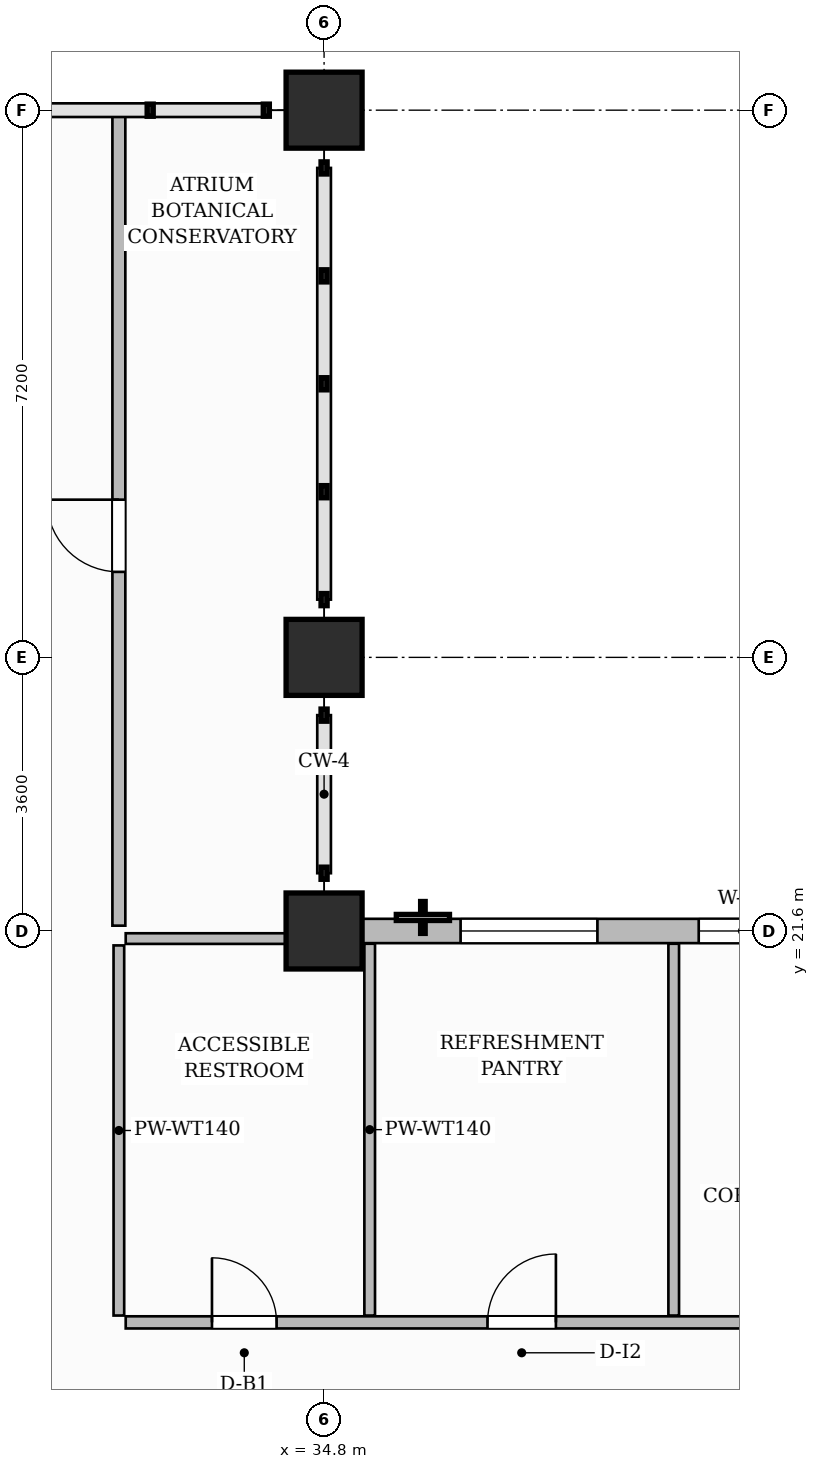
"""IFC4 building model, lengths in metres.
Left out: names, types, materials, properties, quantities, classifications, styles, units other than length and angle.
Written with IfcOpenShell. Run it as: python <this file> out.ifc"""

import sys

from ifc_helpers import new_model, si_unit, direction, frame, frame_2d, origin, origin_2d, place, context, subcontext, project, spatial, rectangle, extrude, source, transform, mapped, element, fill, save


model = new_model("IFC4")
c1 = context("Model", 3, precision=1e-05, world=origin(), true_north=direction((0.0, 1.0)))
c2 = subcontext(c1, "Body", "Model", "MODEL_VIEW")
j1 = project(units=[si_unit("LENGTHUNIT", "METRE"), si_unit("PLANEANGLEUNIT", "RADIAN")], contexts=[c1])
p1 = place(None, origin())
s1 = spatial("IfcSite", under=j1, at=p1, CompositionType="ELEMENT")
p2 = place(p1, origin())
s2 = spatial("IfcBuilding", under=s1, at=p2, CompositionType="ELEMENT")
p3 = place(p2, frame((0.0, 0.0, 145.1)))
s3 = spatial("IfcBuildingStorey", under=s2, at=p3, CompositionType="ELEMENT", Elevation=145.1)
m1 = source(origin(), c2, "Body", "SweptSolid", [
    extrude(rectangle(XDim=1.0, YDim=1.0, at=origin_2d()), origin(), (0.0, 0.0, 1.0), 5.2),
])
for number, where, z_axis, x_axis in (
    (1, (34.8, 21.6, 0.0), (0.0, 0.0, 1.0), (1.0, 0.0, 0.0)),
    (2, (34.8, 25.2, 0.0), (0.0, 0.0, 1.0), (1.0, 0.0, 0.0)),
    (3, (34.8, 32.4, 0.0), (0.0, 0.0, 1.0), (1.0, 0.0, 0.0)),
):
    element("IfcColumn", number, at=place(p3, frame(where, z_axis=z_axis, x_axis=x_axis)), inside=s3, PredefinedType="COLUMN", context=c2, shape_type="MappedRepresentation", body=[
        mapped(m1, transform((0.0, 0.0, 0.0), scale=1.0)),
    ])
p4 = place(p3, frame((32.19, 16.45, 0.0), z_axis=(0.0, 0.0, 1.0), x_axis=(1.0, 0.0, 0.0)))
e4 = element("IfcWall", 4, at=p4, inside=s3, PredefinedType="PARTITIONING", context=c2, shape_type="SweptSolid", body=[
    extrude(rectangle(XDim=17.47, YDim=0.16, at=frame_2d((8.735, 0.0))), origin(), (0.0, 0.0, 1.0), 4.95),
])
p5 = place(p4, frame((1.135, 0.0, 0.0)))
e5 = element("IfcOpeningElement", 5, at=p5, cuts=e4, PredefinedType="OPENING", context=c2, shape_type="SweptSolid", body=[
    extrude(rectangle(XDim=0.85, YDim=2.1, at=frame_2d((0.425, 1.05))), frame((0.0, 0.09, 0.0), z_axis=(0.0, -1.0, 0.0), x_axis=(1.0, 0.0, 0.0)), (0.0, 0.0, 1.0), 0.18),
])
p6 = place(p4, frame((4.76, 0.0, 0.0)))
e6 = element("IfcOpeningElement", 6, at=p6, cuts=e4, PredefinedType="OPENING", context=c2, shape_type="SweptSolid", body=[
    extrude(rectangle(XDim=0.9, YDim=2.15, at=frame_2d((0.45, 1.075))), frame((0.0, 0.09, 0.0), z_axis=(0.0, -1.0, 0.0), x_axis=(1.0, 0.0, 0.0)), (0.0, 0.0, 1.0), 0.18),
])
p7 = place(p4, frame((8.735, 0.0, 0.0)))
e7 = element("IfcOpeningElement", 7, at=p7, cuts=e4, PredefinedType="OPENING", context=c2, shape_type="SweptSolid", body=[
    extrude(rectangle(XDim=0.95, YDim=2.15, at=frame_2d((0.475, 1.075))), frame((0.0, 0.09, 0.0), z_axis=(0.0, -1.0, 0.0), x_axis=(1.0, 0.0, 0.0)), (0.0, 0.0, 1.0), 0.18),
])
p8 = place(p4, frame((14.335, 0.0, 0.0)))
e8 = element("IfcOpeningElement", 8, at=p8, cuts=e4, PredefinedType="OPENING", context=c2, shape_type="SweptSolid", body=[
    extrude(rectangle(XDim=0.95, YDim=2.15, at=frame_2d((0.475, 1.075))), frame((0.0, 0.09, 0.0), z_axis=(0.0, -1.0, 0.0), x_axis=(1.0, 0.0, 0.0)), (0.0, 0.0, 1.0), 0.18),
])
p9 = place(p3, frame((32.1, 16.54, 0.0), z_axis=(0.0, 0.0, 1.0), x_axis=(0.0, 1.0, 0.0)))
e9 = element("IfcWall", 9, at=p9, inside=s3, PredefinedType="PARTITIONING", context=c2, shape_type="SweptSolid", body=[
    extrude(rectangle(XDim=4.87, YDim=0.14, at=frame_2d((2.435, 0.0))), origin(), (0.0, 0.0, 1.0), 4.95),
])
for number, where, z_axis, x_axis in (
    (10, (35.4, 16.54, 0.0), (0.0, 0.0, 1.0), (0.0, 1.0, 0.0)),
    (11, (39.4, 16.54, 0.0), (0.0, 0.0, 1.0), (0.0, 1.0, 0.0)),
):
    element("IfcWall", number, at=place(p3, frame(where, z_axis=z_axis, x_axis=x_axis)), inside=s3, PredefinedType="PARTITIONING", context=c2, shape_type="SweptSolid", body=[
        extrude(rectangle(XDim=4.892, YDim=0.14, at=frame_2d((2.446, 0.0))), origin(), (0.0, 0.0, 1.0), 4.95),
    ])
p10 = place(p3, frame((32.19, 21.5, 0.0), z_axis=(0.0, 0.0, 1.0), x_axis=(1.0, 0.0, 0.0)))
e12 = element("IfcWall", 12, at=p10, inside=s3, PredefinedType="PARTITIONING", context=c2, shape_type="SweptSolid", body=[
    extrude(rectangle(XDim=2.42, YDim=0.14, at=frame_2d((1.21, 0.0))), origin(), (0.0, 0.0, 1.0), 4.335),
])
p11 = place(p3, frame((32.1, 21.67, 0.0), z_axis=(0.0, 0.0, 1.0), x_axis=(0.0, 1.0, 0.0)))
e13 = element("IfcWall", 13, at=p11, inside=s3, PredefinedType="PARTITIONING", context=c2, shape_type="SweptSolid", body=[
    extrude(rectangle(XDim=10.702, YDim=0.17, at=frame_2d((5.351, 0.0))), origin(), (0.0, 0.0, 1.0), 4.95),
])
p12 = place(p11, frame((4.655, 0.0, 0.0)))
e14 = element("IfcOpeningElement", 14, at=p12, cuts=e13, PredefinedType="OPENING", context=c2, shape_type="SweptSolid", body=[
    extrude(rectangle(XDim=0.95, YDim=2.15, at=frame_2d((0.475, 1.075))), frame((0.0, 0.095, 0.0), z_axis=(0.0, -1.0, 0.0), x_axis=(1.0, 0.0, 0.0)), (0.0, 0.0, 1.0), 0.19),
])
p13 = place(p3, frame((34.8, 21.6, 0.0), z_axis=(0.0, 0.0, 1.0), x_axis=(1.0, 0.0, 0.0)))
e15 = element("IfcWall", 15, at=p13, inside=s3, PredefinedType="SOLIDWALL", context=c2, shape_type="SweptSolid", body=[
    extrude(rectangle(XDim=15.0, YDim=0.32, at=frame_2d((7.5, 0.0))), origin(), (0.0, 0.0, 1.0), 4.335),
])
p14 = place(p13, frame((1.796, 0.0, 0.8)))
e16 = element("IfcOpeningElement", 16, at=p14, cuts=e15, PredefinedType="OPENING", context=c2, shape_type="SweptSolid", body=[
    extrude(rectangle(XDim=1.8, YDim=1.85, at=frame_2d((0.9, 0.925))), frame((0.0, 0.17, 0.0), z_axis=(0.0, -1.0, 0.0), x_axis=(1.0, 0.0, 0.0)), (0.0, 0.0, 1.0), 0.34),
])
p15 = place(p13, frame((4.929, 0.0, 0.8)))
e17 = element("IfcOpeningElement", 17, at=p15, cuts=e15, PredefinedType="OPENING", context=c2, shape_type="SweptSolid", body=[
    extrude(rectangle(XDim=1.15, YDim=1.8, at=frame_2d((0.575, 0.9))), frame((0.0, 0.17, 0.0), z_axis=(0.0, -1.0, 0.0), x_axis=(1.0, 0.0, 0.0)), (0.0, 0.0, 1.0), 0.34),
])
p16 = place(p13, frame((8.321, 0.0, 0.8)))
e18 = element("IfcOpeningElement", 18, at=p16, cuts=e15, PredefinedType="OPENING", context=c2, shape_type="SweptSolid", body=[
    extrude(rectangle(XDim=0.95, YDim=1.75, at=frame_2d((0.475, 0.875))), frame((0.0, 0.17, 0.0), z_axis=(0.0, -1.0, 0.0), x_axis=(1.0, 0.0, 0.0)), (0.0, 0.0, 1.0), 0.34),
])
p17 = place(p13, frame((11.004, 0.0, 0.8)))
e19 = element("IfcOpeningElement", 19, at=p17, cuts=e15, PredefinedType="OPENING", context=c2, shape_type="SweptSolid", body=[
    extrude(rectangle(XDim=1.8, YDim=1.85, at=frame_2d((0.9, 0.925))), frame((0.0, 0.17, 0.0), z_axis=(0.0, -1.0, 0.0), x_axis=(1.0, 0.0, 0.0)), (0.0, 0.0, 1.0), 0.34),
])
m2 = source(origin(), c2, "Body", "SweptSolid", [
    extrude(rectangle(XDim=0.85, YDim=2.1, at=frame_2d((0.425, 1.05))), frame((0.0, 0.025, 0.0), z_axis=(0.0, -1.0, 0.0), x_axis=(1.0, 0.0, 0.0)), (0.0, 0.0, 1.0), 0.05),
])
p18 = place(p5, origin())
e20 = element("IfcDoor", 20, at=p18, inside=s3, OperationType="SINGLE_SWING_LEFT", PredefinedType="DOOR", context=c2, shape_type="MappedRepresentation", body=[
    mapped(m2, transform((0.0, 0.0, 0.0), scale=1.0)),
])
fill(e5, e20)
m3 = source(origin(), c2, "Body", "SweptSolid", [
    extrude(rectangle(XDim=0.9, YDim=2.15, at=frame_2d((0.45, 1.075))), frame((0.0, 0.025, 0.0), z_axis=(0.0, -1.0, 0.0), x_axis=(1.0, 0.0, 0.0)), (0.0, 0.0, 1.0), 0.05),
])
p19 = place(p6, origin())
e21 = element("IfcDoor", 21, at=p19, inside=s3, OperationType="SINGLE_SWING_RIGHT", PredefinedType="DOOR", context=c2, shape_type="MappedRepresentation", body=[
    mapped(m3, transform((0.0, 0.0, 0.0), scale=1.0)),
])
fill(e6, e21)
m4 = source(origin(), c2, "Body", "SweptSolid", [
    extrude(rectangle(XDim=0.95, YDim=2.15, at=frame_2d((0.475, 1.075))), frame((0.0, 0.025, 0.0), z_axis=(0.0, -1.0, 0.0), x_axis=(1.0, 0.0, 0.0)), (0.0, 0.0, 1.0), 0.05),
])
p20 = place(p12, origin())
e22 = element("IfcDoor", 22, at=p20, inside=s3, OperationType="SINGLE_SWING_RIGHT", PredefinedType="DOOR", context=c2, shape_type="MappedRepresentation", body=[
    mapped(m4, transform((0.0, 0.0, 0.0), scale=1.0)),
])
fill(e14, e22)
m5 = source(origin(), c2, "Body", "SweptSolid", [
    extrude(rectangle(XDim=1.8, YDim=1.85, at=frame_2d((0.9, 0.925))), frame((0.0, 0.03, 0.0), z_axis=(0.0, -1.0, 0.0), x_axis=(1.0, 0.0, 0.0)), (0.0, 0.0, 1.0), 0.06),
])
p21 = place(p14, origin())
e23 = element("IfcWindow", 23, at=p21, inside=s3, PartitioningType="DOUBLE_PANEL_VERTICAL", PredefinedType="WINDOW", context=c2, shape_type="MappedRepresentation", body=[
    mapped(m5, transform((0.0, 0.0, 0.0), scale=1.0)),
])
fill(e16, e23)
m6 = source(origin(), c2, "Body", "SweptSolid", [
    extrude(rectangle(XDim=1.15, YDim=1.8, at=frame_2d((0.575, 0.9))), frame((0.0, 0.03, 0.0), z_axis=(0.0, -1.0, 0.0), x_axis=(1.0, 0.0, 0.0)), (0.0, 0.0, 1.0), 0.06),
])
p22 = place(p15, origin())
e24 = element("IfcWindow", 24, at=p22, inside=s3, PartitioningType="SINGLE_PANEL", PredefinedType="WINDOW", context=c2, shape_type="MappedRepresentation", body=[
    mapped(m6, transform((0.0, 0.0, 0.0), scale=1.0)),
])
fill(e17, e24)
save(model, sys.argv[1])
